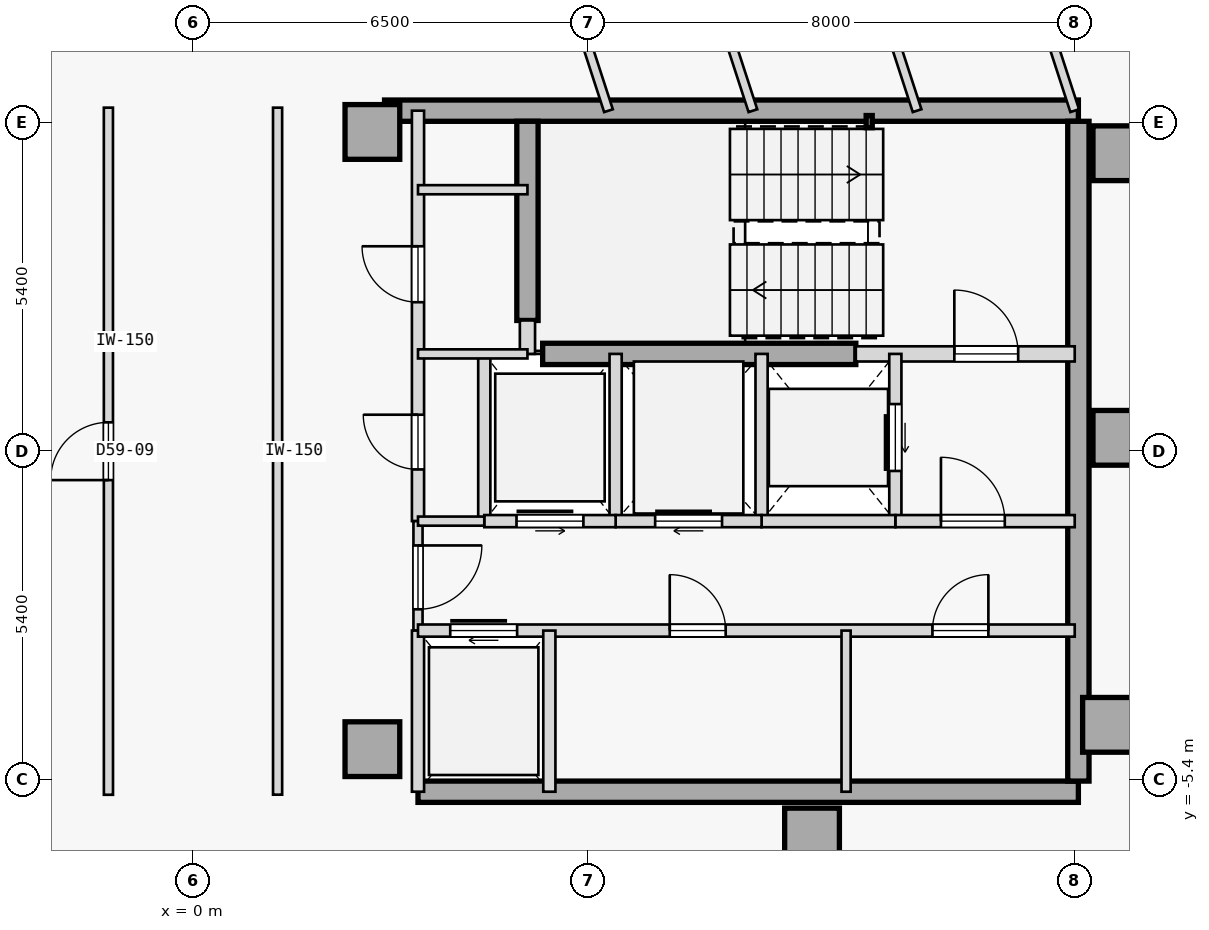
"""IFC4 building model, lengths in metres.
Left out: names, types, materials, properties, quantities, classifications, styles, units other than length and angle.
Written with IfcOpenShell. Run it as: python <this file> out.ifc"""

import sys

from ifc_helpers import new_model, si_unit, direction, frame, frame_2d, origin, origin_2d, place, context, subcontext, project, spatial, rectangle, hollow_rectangle, extrude, element, fill, save


model = new_model("IFC4")
c1 = context("Model", 3, precision=1e-05, world=origin(), true_north=direction((0.0, 1.0)))
c2 = subcontext(c1, "Body", "Model", "MODEL_VIEW")
j1 = project(units=[si_unit("LENGTHUNIT", "METRE"), si_unit("PLANEANGLEUNIT", "RADIAN")], contexts=[c1])
p1 = place(None, origin())
s1 = spatial("IfcSite", under=j1, at=p1, CompositionType="ELEMENT")
p2 = place(p1, origin())
s2 = spatial("IfcBuilding", under=s1, at=p2, CompositionType="ELEMENT")
p3 = place(p2, frame((0.0, 0.0, 224.3)))
s3 = spatial("IfcBuildingStorey", under=s2, at=p3, CompositionType="ELEMENT", Elevation=224.3)
for number, where, z_axis, x_axis in (
    (1, (15.25, 4.9, 0.0), (0.0, 0.0, 1.0), (1.0, 0.0, 0.0)),
    (2, (15.25, 0.22, 0.0), (0.0, 0.0, 1.0), (1.0, 0.0, 0.0)),
    (3, (15.08, -4.5, 0.0), (0.0, 0.0, 1.0), (1.0, 0.0, 0.0)),
    (4, (10.18, -6.32, 0.0), (0.0, 0.0, 1.0), (1.0, 0.0, 0.0)),
    (5, (2.95, -4.9, 0.0), (0.0, 0.0, 1.0), (1.0, 0.0, 0.0)),
    (6, (2.95, 5.25, 0.0), (0.0, 0.0, 1.0), (1.0, 0.0, 0.0)),
):
    element("IfcColumn", number, at=place(p3, frame(where, z_axis=z_axis, x_axis=x_axis)), inside=s3, PredefinedType="COLUMN", context=c2, shape_type="SweptSolid", body=[
        extrude(rectangle(XDim=0.9, YDim=0.9, at=origin_2d()), origin(), (0.0, 0.0, 1.0), 3.35),
    ])
p4 = place(p3, frame((3.15, 5.6, 0.0), z_axis=(0.0, 0.0, 1.0), x_axis=(1.0, 0.0, 0.0)))
e7 = element("IfcWall", 7, at=p4, inside=s3, PredefinedType="SHEAR", context=c2, shape_type="SweptSolid", body=[
    extrude(rectangle(XDim=11.41, YDim=0.35, at=frame_2d((5.705, 0.0))), origin(), (0.0, 0.0, 1.0), 3.125),
])
p5 = place(p3, frame((3.7, -5.6, 0.0), z_axis=(0.0, 0.0, 1.0), x_axis=(1.0, 0.0, 0.0)))
e8 = element("IfcWall", 8, at=p5, inside=s3, PredefinedType="SHEAR", context=c2, shape_type="SweptSolid", body=[
    extrude(rectangle(XDim=10.86, YDim=0.35, at=frame_2d((5.43, 0.0))), origin(), (0.0, 0.0, 1.0), 3.125),
])
p6 = place(p3, frame((14.56, -5.425, 0.0), z_axis=(0.0, 0.0, 1.0), x_axis=(0.0, 1.0, 0.0)))
e9 = element("IfcWall", 9, at=p6, inside=s3, PredefinedType="SHEAR", context=c2, shape_type="SweptSolid", body=[
    extrude(rectangle(XDim=10.85, YDim=0.35, at=frame_2d((5.425, 0.0))), origin(), (0.0, 0.0, 1.0), 3.125),
])
p7 = place(p3, frame((5.5, 2.15, 0.0), z_axis=(0.0, 0.0, 1.0), x_axis=(0.0, 1.0, 0.0)))
e10 = element("IfcWall", 10, at=p7, inside=s3, PredefinedType="SHEAR", context=c2, shape_type="SweptSolid", body=[
    extrude(rectangle(XDim=3.275, YDim=0.35, at=frame_2d((1.638, 0.0))), origin(), (0.0, 0.0, 1.0), 3.125),
])
p8 = place(p3, frame((5.75, 1.6, 0.0), z_axis=(0.0, 0.0, 1.0), x_axis=(1.0, 0.0, 0.0)))
e11 = element("IfcWall", 11, at=p8, inside=s3, PredefinedType="SHEAR", context=c2, shape_type="SweptSolid", body=[
    extrude(rectangle(XDim=5.15, YDim=0.35, at=frame_2d((2.575, 0.0))), origin(), (0.0, 0.0, 1.0), 3.125),
])
p9 = place(p3, frame((11.12, 5.42, 0.0), z_axis=(0.0, 0.0, 1.0), x_axis=(1.0, 0.0, 0.0)))
e12 = element("IfcColumn", 12, at=p9, inside=s3, PredefinedType="COLUMN", context=c2, shape_type="SweptSolid", body=[
    extrude(hollow_rectangle(XDim=0.1, YDim=0.2, WallThickness=0.008, at=origin_2d()), origin(), (0.0, 0.0, 1.0), 3.35),
])
p10 = place(p3, frame((10.9, 1.6, 0.0), z_axis=(0.0, 0.0, 1.0), x_axis=(1.0, 0.0, 0.0)))
e13 = element("IfcWall", 13, at=p10, inside=s3, PredefinedType="STANDARD", context=c2, shape_type="SweptSolid", body=[
    extrude(rectangle(XDim=3.6, YDim=0.25, at=frame_2d((1.8, 0.0))), origin(), (0.0, 0.0, 1.0), 3.125),
])
p11 = place(p10, frame((1.62, 0.0, 0.0)))
e14 = element("IfcOpeningElement", 14, at=p11, cuts=e13, PredefinedType="OPENING", context=c2, shape_type="SweptSolid", body=[
    extrude(rectangle(XDim=1.05, YDim=2.15, at=frame_2d((0.525, 1.075))), frame((0.0, 0.135, 0.0), z_axis=(0.0, -1.0, 0.0), x_axis=(1.0, 0.0, 0.0)), (0.0, 0.0, 1.0), 0.27),
])
p12 = place(p3, frame((5.5, 1.6, 0.0), z_axis=(0.0, 0.0, 1.0), x_axis=(0.0, 1.0, 0.0)))
e15 = element("IfcWall", 15, at=p12, inside=s3, PredefinedType="STANDARD", context=c2, shape_type="SweptSolid", body=[
    extrude(rectangle(XDim=0.55, YDim=0.25, at=frame_2d((0.275, 0.0))), origin(), (0.0, 0.0, 1.0), 3.125),
])
p13 = place(p3, frame((3.7, -1.15, 0.0), z_axis=(0.0, 0.0, 1.0), x_axis=(0.0, 1.0, 0.0)))
e16 = element("IfcWall", 16, at=p13, inside=s3, PredefinedType="STANDARD", context=c2, shape_type="SweptSolid", body=[
    extrude(rectangle(XDim=6.75, YDim=0.2, at=frame_2d((3.375, 0.0))), origin(), (0.0, 0.0, 1.0), 3.125),
])
p14 = place(p13, frame((3.6, 0.0, 0.0)))
e17 = element("IfcOpeningElement", 17, at=p14, cuts=e16, PredefinedType="OPENING", context=c2, shape_type="SweptSolid", body=[
    extrude(rectangle(XDim=0.92, YDim=2.15, at=frame_2d((0.46, 1.075))), frame((0.0, 0.11, 0.0), z_axis=(0.0, -1.0, 0.0), x_axis=(1.0, 0.0, 0.0)), (0.0, 0.0, 1.0), 0.22),
])
p15 = place(p13, frame((0.85, 0.0, 0.0)))
e18 = element("IfcOpeningElement", 18, at=p15, cuts=e16, PredefinedType="OPENING", context=c2, shape_type="SweptSolid", body=[
    extrude(rectangle(XDim=0.9, YDim=2.15, at=frame_2d((0.45, 1.075))), frame((0.0, 0.11, 0.0), z_axis=(0.0, -1.0, 0.0), x_axis=(1.0, 0.0, 0.0)), (0.0, 0.0, 1.0), 0.22),
])
p16 = place(p3, frame((3.7, -2.95, 0.0), z_axis=(0.0, 0.0, 1.0), x_axis=(0.0, 1.0, 0.0)))
e19 = element("IfcWall", 19, at=p16, inside=s3, PredefinedType="PARTITIONING", context=c2, shape_type="SweptSolid", body=[
    extrude(rectangle(XDim=1.8, YDim=0.15, at=frame_2d((0.9, 0.0))), origin(), (0.0, 0.0, 1.0), 3.125),
])
p17 = place(p16, frame((0.35, 0.0, 0.0)))
e20 = element("IfcOpeningElement", 20, at=p17, cuts=e19, PredefinedType="OPENING", context=c2, shape_type="SweptSolid", body=[
    extrude(rectangle(XDim=1.05, YDim=2.18, at=frame_2d((0.525, 1.09))), frame((0.0, 0.085, 0.0), z_axis=(0.0, -1.0, 0.0), x_axis=(1.0, 0.0, 0.0)), (0.0, 0.0, 1.0), 0.17),
])
p18 = place(p3, frame((3.7, -5.6, 0.0), z_axis=(0.0, 0.0, 1.0), x_axis=(0.0, 1.0, 0.0)))
e21 = element("IfcWall", 21, at=p18, inside=s3, PredefinedType="STANDARD", context=c2, shape_type="SweptSolid", body=[
    extrude(rectangle(XDim=2.65, YDim=0.2, at=frame_2d((1.325, 0.0))), origin(), (0.0, 0.0, 1.0), 3.125),
])
p19 = place(p3, frame((11.55, -1.15, 0.0), z_axis=(0.0, 0.0, 1.0), x_axis=(0.0, 1.0, 0.0)))
e22 = element("IfcWall", 22, at=p19, inside=s3, PredefinedType="STANDARD", context=c2, shape_type="SweptSolid", body=[
    extrude(rectangle(XDim=2.75, YDim=0.2, at=frame_2d((1.375, 0.0))), origin(), (0.0, 0.0, 1.0), 3.125),
])
p20 = place(p19, frame((0.825, 0.0, 0.0)))
e23 = element("IfcOpeningElement", 23, at=p20, cuts=e22, PredefinedType="OPENING", context=c2, shape_type="SweptSolid", body=[
    extrude(rectangle(XDim=1.1, YDim=2.15, at=frame_2d((0.55, 1.075))), frame((0.0, 0.11, 0.0), z_axis=(0.0, -1.0, 0.0), x_axis=(1.0, 0.0, 0.0)), (0.0, 0.0, 1.0), 0.22),
])
p21 = place(p3, frame((9.35, -1.15, 0.0), z_axis=(0.0, 0.0, 1.0), x_axis=(0.0, 1.0, 0.0)))
e24 = element("IfcWall", 24, at=p21, inside=s3, PredefinedType="STANDARD", context=c2, shape_type="SweptSolid", body=[
    extrude(rectangle(XDim=2.75, YDim=0.2, at=frame_2d((1.375, 0.0))), origin(), (0.0, 0.0, 1.0), 3.125),
])
p22 = place(p3, frame((11.55, -1.15, 0.0), z_axis=(0.0, 0.0, 1.0), x_axis=(1.0, 0.0, 0.0)))
e25 = element("IfcWall", 25, at=p22, inside=s3, PredefinedType="STANDARD", context=c2, shape_type="SweptSolid", body=[
    extrude(rectangle(XDim=2.95, YDim=0.2, at=frame_2d((1.475, 0.0))), origin(), (0.0, 0.0, 1.0), 3.125),
])
p23 = place(p22, frame((0.75, 0.0, 0.0)))
e26 = element("IfcOpeningElement", 26, at=p23, cuts=e25, PredefinedType="OPENING", context=c2, shape_type="SweptSolid", body=[
    extrude(rectangle(XDim=1.05, YDim=2.18, at=frame_2d((0.525, 1.09))), frame((0.0, 0.11, 0.0), z_axis=(0.0, -1.0, 0.0), x_axis=(1.0, 0.0, 0.0)), (0.0, 0.0, 1.0), 0.22),
])
p24 = place(p3, frame((9.35, -1.15, 0.0), z_axis=(0.0, 0.0, 1.0), x_axis=(1.0, 0.0, 0.0)))
e27 = element("IfcWall", 27, at=p24, inside=s3, PredefinedType="STANDARD", context=c2, shape_type="SweptSolid", body=[
    extrude(rectangle(XDim=2.2, YDim=0.2, at=frame_2d((1.1, 0.0))), origin(), (0.0, 0.0, 1.0), 3.125),
])
p25 = place(p3, frame((6.95, -1.15, 0.0), z_axis=(0.0, 0.0, 1.0), x_axis=(0.0, 1.0, 0.0)))
e28 = element("IfcWall", 28, at=p25, inside=s3, PredefinedType="STANDARD", context=c2, shape_type="SweptSolid", body=[
    extrude(rectangle(XDim=2.75, YDim=0.2, at=frame_2d((1.375, 0.0))), origin(), (0.0, 0.0, 1.0), 3.125),
])
p26 = place(p3, frame((6.95, -1.15, 0.0), z_axis=(0.0, 0.0, 1.0), x_axis=(1.0, 0.0, 0.0)))
e29 = element("IfcWall", 29, at=p26, inside=s3, PredefinedType="STANDARD", context=c2, shape_type="SweptSolid", body=[
    extrude(rectangle(XDim=2.4, YDim=0.2, at=frame_2d((1.2, 0.0))), origin(), (0.0, 0.0, 1.0), 3.125),
])
p27 = place(p26, frame((0.65, 0.0, 0.0)))
e30 = element("IfcOpeningElement", 30, at=p27, cuts=e29, PredefinedType="OPENING", context=c2, shape_type="SweptSolid", body=[
    extrude(rectangle(XDim=1.1, YDim=2.15, at=frame_2d((0.55, 1.075))), frame((0.0, 0.11, 0.0), z_axis=(0.0, -1.0, 0.0), x_axis=(1.0, 0.0, 0.0)), (0.0, 0.0, 1.0), 0.22),
])
p28 = place(p3, frame((4.79, -1.15, 0.0), z_axis=(0.0, 0.0, 1.0), x_axis=(0.0, 1.0, 0.0)))
e31 = element("IfcWall", 31, at=p28, inside=s3, PredefinedType="STANDARD", context=c2, shape_type="SweptSolid", body=[
    extrude(rectangle(XDim=2.75, YDim=0.2, at=frame_2d((1.375, 0.0))), origin(), (0.0, 0.0, 1.0), 3.125),
])
p29 = place(p3, frame((4.79, -1.15, 0.0), z_axis=(0.0, 0.0, 1.0), x_axis=(1.0, 0.0, 0.0)))
e32 = element("IfcWall", 32, at=p29, inside=s3, PredefinedType="STANDARD", context=c2, shape_type="SweptSolid", body=[
    extrude(rectangle(XDim=2.16, YDim=0.2, at=frame_2d((1.08, 0.0))), origin(), (0.0, 0.0, 1.0), 3.125),
])
p30 = place(p29, frame((0.53, 0.0, 0.0)))
e33 = element("IfcOpeningElement", 33, at=p30, cuts=e32, PredefinedType="OPENING", context=c2, shape_type="SweptSolid", body=[
    extrude(rectangle(XDim=1.1, YDim=2.15, at=frame_2d((0.55, 1.075))), frame((0.0, 0.11, 0.0), z_axis=(0.0, -1.0, 0.0), x_axis=(1.0, 0.0, 0.0)), (0.0, 0.0, 1.0), 0.22),
])
p31 = place(p3, frame((3.7, -1.15, 0.0), z_axis=(0.0, 0.0, 1.0), x_axis=(1.0, 0.0, 0.0)))
e34 = element("IfcWall", 34, at=p31, inside=s3, PredefinedType="PARTITIONING", context=c2, shape_type="SweptSolid", body=[
    extrude(rectangle(XDim=1.09, YDim=0.15, at=frame_2d((0.545, 0.0))), origin(), (0.0, 0.0, 1.0), 3.125),
])
p32 = place(p3, frame((3.7, -2.95, 0.0), z_axis=(0.0, 0.0, 1.0), x_axis=(1.0, 0.0, 0.0)))
e35 = element("IfcWall", 35, at=p32, inside=s3, PredefinedType="STANDARD", context=c2, shape_type="SweptSolid", body=[
    extrude(rectangle(XDim=10.8, YDim=0.2, at=frame_2d((5.4, 0.0))), origin(), (0.0, 0.0, 1.0), 3.125),
])
p33 = place(p32, frame((0.53, 0.0, 0.0)))
e36 = element("IfcOpeningElement", 36, at=p33, cuts=e35, PredefinedType="OPENING", context=c2, shape_type="SweptSolid", body=[
    extrude(rectangle(XDim=1.1, YDim=2.15, at=frame_2d((0.55, 1.075))), frame((0.0, 0.11, 0.0), z_axis=(0.0, -1.0, 0.0), x_axis=(1.0, 0.0, 0.0)), (0.0, 0.0, 1.0), 0.22),
])
p34 = place(p32, frame((4.14, 0.0, 0.0)))
e37 = element("IfcOpeningElement", 37, at=p34, cuts=e35, PredefinedType="OPENING", context=c2, shape_type="SweptSolid", body=[
    extrude(rectangle(XDim=0.92, YDim=2.15, at=frame_2d((0.46, 1.075))), frame((0.0, 0.11, 0.0), z_axis=(0.0, -1.0, 0.0), x_axis=(1.0, 0.0, 0.0)), (0.0, 0.0, 1.0), 0.22),
])
p35 = place(p32, frame((8.46, 0.0, 0.0)))
e38 = element("IfcOpeningElement", 38, at=p35, cuts=e35, PredefinedType="OPENING", context=c2, shape_type="SweptSolid", body=[
    extrude(rectangle(XDim=0.92, YDim=2.15, at=frame_2d((0.46, 1.075))), frame((0.0, 0.11, 0.0), z_axis=(0.0, -1.0, 0.0), x_axis=(1.0, 0.0, 0.0)), (0.0, 0.0, 1.0), 0.22),
])
p36 = place(p3, frame((5.86, -5.6, 0.0), z_axis=(0.0, 0.0, 1.0), x_axis=(0.0, 1.0, 0.0)))
e39 = element("IfcWall", 39, at=p36, inside=s3, PredefinedType="STANDARD", context=c2, shape_type="SweptSolid", body=[
    extrude(rectangle(XDim=2.65, YDim=0.2, at=frame_2d((1.325, 0.0))), origin(), (0.0, 0.0, 1.0), 3.125),
])
p37 = place(p3, frame((10.74, -5.6, 0.0), z_axis=(0.0, 0.0, 1.0), x_axis=(0.0, 1.0, 0.0)))
e40 = element("IfcWall", 40, at=p37, inside=s3, PredefinedType="PARTITIONING", context=c2, shape_type="SweptSolid", body=[
    extrude(rectangle(XDim=2.65, YDim=0.15, at=frame_2d((1.325, 0.0))), origin(), (0.0, 0.0, 1.0), 3.125),
])
for number, where, z_axis, x_axis in (
    (41, (3.7, 4.3, 0.0), (0.0, 0.0, 1.0), (1.0, 0.0, 0.0)),
    (42, (3.7, 1.6, 0.0), (0.0, 0.0, 1.0), (1.0, 0.0, 0.0)),
):
    element("IfcWall", number, at=place(p3, frame(where, z_axis=z_axis, x_axis=x_axis)), inside=s3, PredefinedType="PARTITIONING", context=c2, shape_type="SweptSolid", body=[
        extrude(rectangle(XDim=1.8, YDim=0.15, at=frame_2d((0.9, 0.0))), origin(), (0.0, 0.0, 1.0), 3.125),
    ])
p38 = place(p3, frame((-1.391, -5.65, 0.0), z_axis=(0.0, 0.0, 1.0), x_axis=(-8.6422954e-05, 0.999999996266, 0.0)))
e43 = element("IfcWall", 43, at=p38, inside=s3, PredefinedType="PARTITIONING", context=c2, shape_type="SweptSolid", body=[
    extrude(rectangle(XDim=11.3, YDim=0.15, at=frame_2d((5.65, 0.0))), origin(), (0.0, 0.0, 1.0), 3.125),
])
p39 = place(p38, frame((5.175, 0.0, 0.0)))
e44 = element("IfcOpeningElement", 44, at=p39, cuts=e43, PredefinedType="OPENING", context=c2, shape_type="SweptSolid", body=[
    extrude(rectangle(XDim=0.95, YDim=2.15, at=frame_2d((0.475, 1.075))), frame((0.0, 0.085, 0.0), z_axis=(0.0, -1.0, 0.0), x_axis=(1.0, 0.0, 0.0)), (0.0, 0.0, 1.0), 0.17),
])
p40 = place(p3, frame((1.391, -5.648, 0.0), z_axis=(0.0, 0.0, 1.0), x_axis=(-4.3218947e-05, 0.999999999066, 0.0)))
e45 = element("IfcWall", 45, at=p40, inside=s3, PredefinedType="PARTITIONING", context=c2, shape_type="SweptSolid", body=[
    extrude(rectangle(XDim=11.298, YDim=0.15, at=frame_2d((5.649, 0.0))), origin(), (0.0, 0.0, 1.0), 3.125),
])
p41 = place(p3, frame((12.517, -7.948, 0.0), z_axis=(0.0, 0.0, 1.0), x_axis=(0.951053764264, 0.309025464128, 0.0)))
e46 = element("IfcWall", 46, at=p41, inside=s3, PredefinedType="PARTITIONING", context=c2, shape_type="SweptSolid", body=[
    extrude(rectangle(XDim=18.399, YDim=0.15, at=frame_2d((9.2, 0.0))), origin(), (0.0, 0.0, 1.0), 3.125),
])
p42 = place(p41, frame((8.725, 0.0, 0.0)))
e47 = element("IfcOpeningElement", 47, at=p42, cuts=e46, PredefinedType="OPENING", context=c2, shape_type="SweptSolid", body=[
    extrude(rectangle(XDim=0.95, YDim=2.15, at=frame_2d((0.475, 1.075))), frame((0.0, 0.085, 0.0), z_axis=(0.0, -1.0, 0.0), x_axis=(1.0, 0.0, 0.0)), (0.0, 0.0, 1.0), 0.17),
])
p43 = place(p3, frame((6.833, 5.6, 0.0), z_axis=(0.0, 0.0, 1.0), x_axis=(-0.309019923183, 0.951055564663, 0.0)))
e48 = element("IfcWall", 48, at=p43, inside=s3, PredefinedType="PARTITIONING", context=c2, shape_type="SweptSolid", body=[
    extrude(rectangle(XDim=6.593, YDim=0.15, at=frame_2d((3.296, 0.0))), origin(), (0.0, 0.0, 1.0), 2.675),
])
p44 = place(p3, frame((9.208, 5.6, 0.0), z_axis=(0.0, 0.0, 1.0), x_axis=(-0.309021275068, 0.951055125403, 0.0)))
e49 = element("IfcWall", 49, at=p44, inside=s3, PredefinedType="PARTITIONING", context=c2, shape_type="SweptSolid", body=[
    extrude(rectangle(XDim=7.327, YDim=0.15, at=frame_2d((3.664, 0.0))), origin(), (0.0, 0.0, 1.0), 3.125),
])
p45 = place(p3, frame((11.908, 5.6, 0.0), z_axis=(0.0, 0.0, 1.0), x_axis=(-0.308994076163, 0.951063962568, 0.0)))
e50 = element("IfcWall", 50, at=p45, inside=s3, PredefinedType="PARTITIONING", context=c2, shape_type="SweptSolid", body=[
    extrude(rectangle(XDim=8.161, YDim=0.15, at=frame_2d((4.081, 0.0))), origin(), (0.0, 0.0, 1.0), 3.125),
])
p46 = place(p3, frame((14.5, 5.6, 0.0), z_axis=(0.0, 0.0, 1.0), x_axis=(-0.309015253813, 0.951057081836, 0.0)))
e51 = element("IfcWall", 51, at=p46, inside=s3, PredefinedType="PARTITIONING", context=c2, shape_type="SweptSolid", body=[
    extrude(rectangle(XDim=3.274, YDim=0.15, at=frame_2d((1.637, 0.0))), origin(), (0.0, 0.0, 1.0), 3.125),
])
p47 = place(p3, frame((14.821, 4.61, 0.0), z_axis=(0.0, 0.0, 1.0), x_axis=(0.951063700751, 0.30899488202, 0.0)))
e52 = element("IfcWall", 52, at=p47, inside=s3, PredefinedType="PARTITIONING", context=c2, shape_type="SweptSolid", body=[
    extrude(rectangle(XDim=10.352, YDim=0.15, at=frame_2d((5.176, 0.0))), origin(), (0.0, 0.0, 1.0), 3.125),
])
p48 = place(p47, frame((4.716, 0.0, 0.0)))
e53 = element("IfcOpeningElement", 53, at=p48, cuts=e52, PredefinedType="OPENING", context=c2, shape_type="SweptSolid", body=[
    extrude(rectangle(XDim=0.92, YDim=2.15, at=frame_2d((0.46, 1.075))), frame((0.0, 0.085, 0.0), z_axis=(0.0, -1.0, 0.0), x_axis=(1.0, 0.0, 0.0)), (0.0, 0.0, 1.0), 0.17),
])
p49 = place(p11, origin())
e54 = element("IfcDoor", 54, at=p49, inside=s3, OperationType="SINGLE_SWING_LEFT", PredefinedType="DOOR", context=c2, shape_type="SweptSolid", body=[
    extrude(rectangle(XDim=1.05, YDim=2.15, at=frame_2d((0.525, 1.075))), frame((0.0, 0.025, 0.0), z_axis=(0.0, -1.0, 0.0), x_axis=(1.0, 0.0, 0.0)), (0.0, 0.0, 1.0), 0.05),
])
fill(e14, e54)
p50 = place(p23, origin())
e55 = element("IfcDoor", 55, at=p50, inside=s3, OperationType="SINGLE_SWING_LEFT", PredefinedType="DOOR", context=c2, shape_type="SweptSolid", body=[
    extrude(rectangle(XDim=1.05, YDim=2.18, at=frame_2d((0.525, 1.09))), frame((0.0, 0.025, 0.0), z_axis=(0.0, -1.0, 0.0), x_axis=(1.0, 0.0, 0.0)), (0.0, 0.0, 1.0), 0.05),
])
fill(e26, e55)
p51 = place(p17, frame((1.05, 0.0, 0.0), z_axis=(0.0, 0.0, 1.0), x_axis=(-1.0, 0.0, 0.0)))
e56 = element("IfcDoor", 56, at=p51, inside=s3, OperationType="SINGLE_SWING_RIGHT", PredefinedType="DOOR", context=c2, shape_type="SweptSolid", body=[
    extrude(rectangle(XDim=1.05, YDim=2.18, at=frame_2d((0.525, 1.09))), frame((0.0, 0.025, 0.0), z_axis=(0.0, -1.0, 0.0), x_axis=(1.0, 0.0, 0.0)), (0.0, 0.0, 1.0), 0.05),
])
fill(e20, e56)
p52 = place(p20, origin())
e57 = element("IfcDoor", 57, at=p52, inside=s3, OperationType="SLIDING_TO_RIGHT", PredefinedType="DOOR", context=c2, shape_type="SweptSolid", body=[
    extrude(rectangle(XDim=1.1, YDim=2.15, at=frame_2d((0.55, 1.075))), frame((0.0, 0.025, 0.0), z_axis=(0.0, -1.0, 0.0), x_axis=(1.0, 0.0, 0.0)), (0.0, 0.0, 1.0), 0.05),
])
fill(e23, e57)
p53 = place(p27, origin())
e58 = element("IfcDoor", 58, at=p53, inside=s3, OperationType="SLIDING_TO_RIGHT", PredefinedType="DOOR", context=c2, shape_type="SweptSolid", body=[
    extrude(rectangle(XDim=1.1, YDim=2.15, at=frame_2d((0.55, 1.075))), frame((0.0, 0.025, 0.0), z_axis=(0.0, -1.0, 0.0), x_axis=(1.0, 0.0, 0.0)), (0.0, 0.0, 1.0), 0.05),
])
fill(e30, e58)
p54 = place(p30, origin())
e59 = element("IfcDoor", 59, at=p54, inside=s3, OperationType="SLIDING_TO_LEFT", PredefinedType="DOOR", context=c2, shape_type="SweptSolid", body=[
    extrude(rectangle(XDim=1.1, YDim=2.15, at=frame_2d((0.55, 1.075))), frame((0.0, 0.025, 0.0), z_axis=(0.0, -1.0, 0.0), x_axis=(1.0, 0.0, 0.0)), (0.0, 0.0, 1.0), 0.05),
])
fill(e33, e59)
p55 = place(p33, origin())
e60 = element("IfcDoor", 60, at=p55, inside=s3, OperationType="SLIDING_TO_RIGHT", PredefinedType="DOOR", context=c2, shape_type="SweptSolid", body=[
    extrude(rectangle(XDim=1.1, YDim=2.15, at=frame_2d((0.55, 1.075))), frame((0.0, 0.025, 0.0), z_axis=(0.0, -1.0, 0.0), x_axis=(1.0, 0.0, 0.0)), (0.0, 0.0, 1.0), 0.05),
])
fill(e36, e60)
p56 = place(p34, origin())
e61 = element("IfcDoor", 61, at=p56, inside=s3, OperationType="SINGLE_SWING_LEFT", PredefinedType="DOOR", context=c2, shape_type="SweptSolid", body=[
    extrude(rectangle(XDim=0.92, YDim=2.15, at=frame_2d((0.46, 1.075))), frame((0.0, 0.025, 0.0), z_axis=(0.0, -1.0, 0.0), x_axis=(1.0, 0.0, 0.0)), (0.0, 0.0, 1.0), 0.05),
])
fill(e37, e61)
p57 = place(p35, origin())
e62 = element("IfcDoor", 62, at=p57, inside=s3, OperationType="SINGLE_SWING_RIGHT", PredefinedType="DOOR", context=c2, shape_type="SweptSolid", body=[
    extrude(rectangle(XDim=0.92, YDim=2.15, at=frame_2d((0.46, 1.075))), frame((0.0, 0.025, 0.0), z_axis=(0.0, -1.0, 0.0), x_axis=(1.0, 0.0, 0.0)), (0.0, 0.0, 1.0), 0.05),
])
fill(e38, e62)
p58 = place(p14, origin())
e63 = element("IfcDoor", 63, at=p58, inside=s3, OperationType="SINGLE_SWING_RIGHT", PredefinedType="DOOR", context=c2, shape_type="SweptSolid", body=[
    extrude(rectangle(XDim=0.92, YDim=2.15, at=frame_2d((0.46, 1.075))), frame((0.0, 0.025, 0.0), z_axis=(0.0, -1.0, 0.0), x_axis=(1.0, 0.0, 0.0)), (0.0, 0.0, 1.0), 0.05),
])
fill(e17, e63)
p59 = place(p15, origin())
e64 = element("IfcDoor", 64, at=p59, inside=s3, OperationType="SINGLE_SWING_RIGHT", PredefinedType="DOOR", context=c2, shape_type="SweptSolid", body=[
    extrude(rectangle(XDim=0.9, YDim=2.15, at=frame_2d((0.45, 1.075))), frame((0.0, 0.025, 0.0), z_axis=(0.0, -1.0, 0.0), x_axis=(1.0, 0.0, 0.0)), (0.0, 0.0, 1.0), 0.05),
])
fill(e18, e64)
p60 = place(p39, origin())
e65 = element("IfcDoor", 65, at=p60, inside=s3, OperationType="SINGLE_SWING_LEFT", PredefinedType="DOOR", context=c2, shape_type="SweptSolid", body=[
    extrude(rectangle(XDim=0.95, YDim=2.15, at=frame_2d((0.475, 1.075))), frame((0.0, 0.025, 0.0), z_axis=(0.0, -1.0, 0.0), x_axis=(1.0, 0.0, 0.0)), (0.0, 0.0, 1.0), 0.05),
])
fill(e44, e65)
save(model, sys.argv[1])
